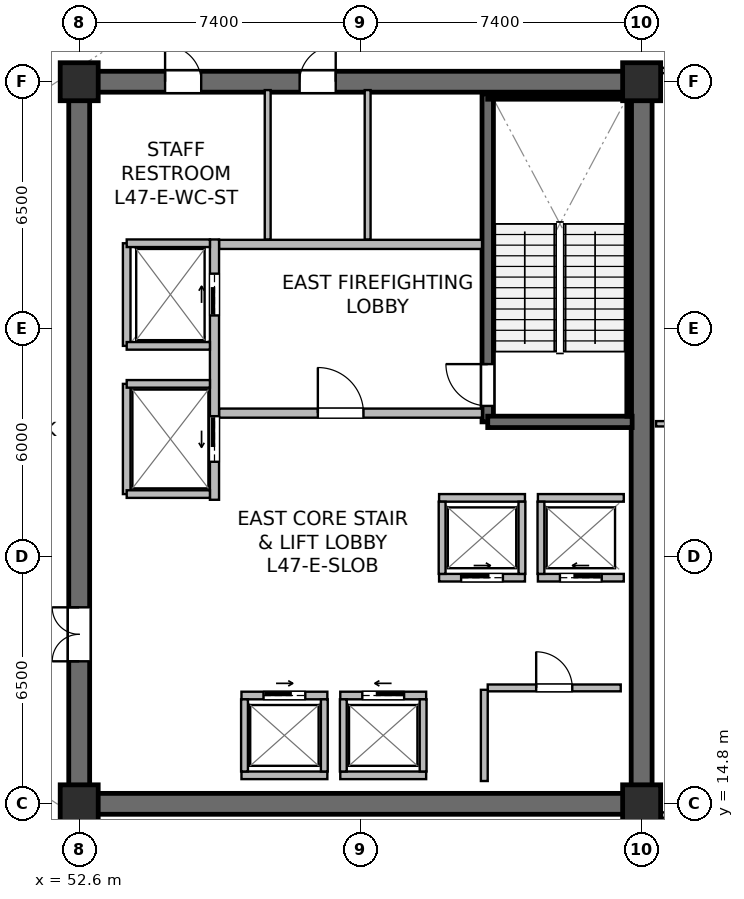
"""IFC4 building model, lengths in metres.
Left out: names, types, materials, properties, quantities, classifications, styles, units other than length and angle.
Written with IfcOpenShell. Run it as: python <this file> out.ifc"""

import sys

from ifc_helpers import new_model, si_unit, direction, frame, frame_2d, origin, origin_2d, place, context, subcontext, project, spatial, rectangle, extrude, source, transform, mapped, element, fill, save


model = new_model("IFC4")
c1 = context("Model", 3, precision=1e-05, world=origin(), true_north=direction((0.0, 1.0)))
c2 = subcontext(c1, "Body", "Model", "MODEL_VIEW")
j1 = project(units=[si_unit("LENGTHUNIT", "METRE"), si_unit("PLANEANGLEUNIT", "RADIAN")], contexts=[c1])
p1 = place(None, origin())
s1 = spatial("IfcSite", under=j1, at=p1, CompositionType="ELEMENT")
p2 = place(p1, origin())
s2 = spatial("IfcBuilding", under=s1, at=p2, CompositionType="ELEMENT")
p3 = place(p2, frame((0.0, 0.0, 196.6)))
s3 = spatial("IfcBuildingStorey", under=s2, at=p3, CompositionType="ELEMENT", Elevation=196.6)
p4 = place(p3, frame((52.325, 14.8, 0.0), z_axis=(0.0, 0.0, 1.0), x_axis=(1.0, 0.0, 0.0)))
e1 = element("IfcWall", 1, at=p4, inside=s3, PredefinedType="SHEAR", context=c2, shape_type="SweptSolid", body=[
    extrude(rectangle(XDim=15.35, YDim=0.55, at=frame_2d((7.675, 0.0))), origin(), (0.0, 0.0, 1.0), 4.5),
])
p5 = place(p3, frame((52.325, 33.8, 0.0), z_axis=(0.0, 0.0, 1.0), x_axis=(1.0, 0.0, 0.0)))
e2 = element("IfcWall", 2, at=p5, inside=s3, PredefinedType="SHEAR", context=c2, shape_type="SweptSolid", body=[
    extrude(rectangle(XDim=15.35, YDim=0.55, at=frame_2d((7.675, 0.0))), origin(), (0.0, 0.0, 1.0), 4.5),
])
p6 = place(p5, frame((6.075, 0.0, 0.0)))
e3 = element("IfcOpeningElement", 3, at=p6, cuts=e2, PredefinedType="OPENING", context=c2, shape_type="SweptSolid", body=[
    extrude(rectangle(XDim=0.95, YDim=2.15, at=frame_2d((0.475, 1.075))), frame((0.0, 0.285, 0.0), z_axis=(0.0, -1.0, 0.0), x_axis=(1.0, 0.0, 0.0)), (0.0, 0.0, 1.0), 0.57),
])
p7 = place(p5, frame((2.535, 0.0, 0.0)))
e4 = element("IfcOpeningElement", 4, at=p7, cuts=e2, PredefinedType="OPENING", context=c2, shape_type="SweptSolid", body=[
    extrude(rectangle(XDim=0.95, YDim=2.15, at=frame_2d((0.475, 1.075))), frame((0.0, 0.285, 0.0), z_axis=(0.0, -1.0, 0.0), x_axis=(1.0, 0.0, 0.0)), (0.0, 0.0, 1.0), 0.57),
])
p8 = place(p3, frame((52.6, 15.075, 0.0), z_axis=(0.0, 0.0, 1.0), x_axis=(0.0, 1.0, 0.0)))
e5 = element("IfcWall", 5, at=p8, inside=s3, PredefinedType="SHEAR", context=c2, shape_type="SweptSolid", body=[
    extrude(rectangle(XDim=18.45, YDim=0.55, at=frame_2d((9.225, 0.0))), origin(), (0.0, 0.0, 1.0), 4.5),
])
p9 = place(p8, frame((3.475, 0.0, 0.0)))
e6 = element("IfcOpeningElement", 6, at=p9, cuts=e5, PredefinedType="OPENING", context=c2, shape_type="SweptSolid", body=[
    extrude(rectangle(XDim=1.42, YDim=2.2, at=frame_2d((0.71, 1.1))), frame((0.0, 0.285, 0.0), z_axis=(0.0, -1.0, 0.0), x_axis=(1.0, 0.0, 0.0)), (0.0, 0.0, 1.0), 0.57),
])
p10 = place(p3, frame((67.4, 15.075, 0.0), z_axis=(0.0, 0.0, 1.0), x_axis=(0.0, 1.0, 0.0)))
e7 = element("IfcWall", 7, at=p10, inside=s3, PredefinedType="SHEAR", context=c2, shape_type="SweptSolid", body=[
    extrude(rectangle(XDim=18.45, YDim=0.55, at=frame_2d((9.225, 0.0))), origin(), (0.0, 0.0, 1.0), 4.5),
])
p11 = place(p3, frame((63.35, 24.85, 0.0), z_axis=(0.0, 0.0, 1.0), x_axis=(0.0, 1.0, 0.0)))
e8 = element("IfcWall", 8, at=p11, inside=s3, PredefinedType="SHEAR", context=c2, shape_type="SweptSolid", body=[
    extrude(rectangle(XDim=8.63, YDim=0.3, at=frame_2d((4.315, 0.0))), origin(), (0.0, 0.0, 1.0), 4.5),
])
p12 = place(p11, frame((0.42, 0.0, 0.0)))
e9 = element("IfcOpeningElement", 9, at=p12, cuts=e8, PredefinedType="OPENING", context=c2, shape_type="SweptSolid", body=[
    extrude(rectangle(XDim=1.1, YDim=2.15, at=frame_2d((0.55, 1.075))), frame((0.0, 0.16, 0.0), z_axis=(0.0, -1.0, 0.0), x_axis=(1.0, 0.0, 0.0)), (0.0, 0.0, 1.0), 0.32),
])
p13 = place(p3, frame((63.35, 24.85, 0.0), z_axis=(0.0, 0.0, 1.0), x_axis=(1.0, 0.0, 0.0)))
e10 = element("IfcWall", 10, at=p13, inside=s3, PredefinedType="SHEAR", context=c2, shape_type="SweptSolid", body=[
    extrude(rectangle(XDim=3.8, YDim=0.3, at=frame_2d((1.9, 0.0))), origin(), (0.0, 0.0, 1.0), 4.5),
])
p14 = place(p3, frame((63.35, 33.4, 0.0), z_axis=(0.0, 0.0, 1.0), x_axis=(1.0, 0.0, 0.0)))
e11 = element("IfcWall", 11, at=p14, inside=s3, PredefinedType="SOLIDWALL", context=c2, shape_type="SweptSolid", body=[
    extrude(rectangle(XDim=3.72, YDim=0.12, at=frame_2d((1.86, 0.0))), origin(), (0.0, 0.0, 1.0), 4.5),
])
p15 = place(p3, frame((67.07, 25.0, 0.0), z_axis=(0.0, 0.0, 1.0), x_axis=(0.0, 1.0, 0.0)))
e12 = element("IfcWall", 12, at=p15, inside=s3, PredefinedType="SOLIDWALL", context=c2, shape_type="SweptSolid", body=[
    extrude(rectangle(XDim=8.32, YDim=0.12, at=frame_2d((4.16, 0.0))), origin(), (0.0, 0.0, 1.0), 4.5),
])
m1 = source(origin(), c2, "Body", "SweptSolid", [
    extrude(rectangle(XDim=1.0, YDim=1.0, at=origin_2d()), origin(), (0.0, 0.0, 1.0), 4.8),
])
for number, where, z_axis, x_axis in (
    (13, (52.6, 14.8, 0.0), (0.0, 0.0, 1.0), (1.0, 0.0, 0.0)),
    (14, (67.4, 14.8, 0.0), (0.0, 0.0, 1.0), (1.0, 0.0, 0.0)),
    (15, (52.6, 33.8, 0.0), (0.0, 0.0, 1.0), (1.0, 0.0, 0.0)),
    (16, (67.4, 33.8, 0.0), (0.0, 0.0, 1.0), (1.0, 0.0, 0.0)),
):
    element("IfcColumn", number, at=place(p3, frame(where, z_axis=z_axis, x_axis=x_axis)), inside=s3, PredefinedType="COLUMN", context=c2, shape_type="MappedRepresentation", body=[
        mapped(m1, transform((0.0, 0.0, 0.0), scale=1.0)),
    ])
p16 = place(p3, frame((56.28, 25.08, 0.0), z_axis=(0.0, 0.0, 1.0), x_axis=(1.0, 0.0, 0.0)))
e17 = element("IfcWall", 17, at=p16, inside=s3, PredefinedType="SOLIDWALL", context=c2, shape_type="SweptSolid", body=[
    extrude(rectangle(XDim=6.92, YDim=0.24, at=frame_2d((3.46, 0.0))), origin(), (0.0, 0.0, 1.0), 3.897),
])
p17 = place(p16, frame((2.6, 0.0, 0.0)))
e18 = element("IfcOpeningElement", 18, at=p17, cuts=e17, PredefinedType="OPENING", context=c2, shape_type="SweptSolid", body=[
    extrude(rectangle(XDim=1.2, YDim=2.16, at=frame_2d((0.6, 1.08))), frame((0.0, 0.13, 0.0), z_axis=(0.0, -1.0, 0.0), x_axis=(1.0, 0.0, 0.0)), (0.0, 0.0, 1.0), 0.26),
])
p18 = place(p3, frame((56.28, 29.52, 0.0), z_axis=(0.0, 0.0, 1.0), x_axis=(1.0, 0.0, 0.0)))
e19 = element("IfcWall", 19, at=p18, inside=s3, PredefinedType="SOLIDWALL", context=c2, shape_type="SweptSolid", body=[
    extrude(rectangle(XDim=6.92, YDim=0.24, at=frame_2d((3.46, 0.0))), origin(), (0.0, 0.0, 1.0), 3.897),
])
p19 = place(p3, frame((56.16, 22.8, 0.0), z_axis=(0.0, 0.0, 1.0), x_axis=(0.0, 1.0, 0.0)))
e20 = element("IfcWall", 20, at=p19, inside=s3, PredefinedType="SOLIDWALL", context=c2, shape_type="SweptSolid", body=[
    extrude(rectangle(XDim=6.85, YDim=0.24, at=frame_2d((3.425, 0.0))), origin(), (0.0, 0.0, 1.0), 3.635),
])
p20 = place(p19, frame((4.85, 0.0, 0.0)))
e21 = element("IfcOpeningElement", 21, at=p20, cuts=e20, PredefinedType="OPENING", context=c2, shape_type="SweptSolid", body=[
    extrude(rectangle(XDim=1.1, YDim=2.22, at=frame_2d((0.55, 1.11))), frame((0.0, 0.13, 0.0), z_axis=(0.0, -1.0, 0.0), x_axis=(1.0, 0.0, 0.0)), (0.0, 0.0, 1.0), 0.26),
])
p21 = place(p19, frame((1.0, 0.0, 0.0)))
e22 = element("IfcOpeningElement", 22, at=p21, cuts=e20, PredefinedType="OPENING", context=c2, shape_type="SweptSolid", body=[
    extrude(rectangle(XDim=1.2, YDim=2.22, at=frame_2d((0.6, 1.11))), frame((0.0, 0.13, 0.0), z_axis=(0.0, -1.0, 0.0), x_axis=(1.0, 0.0, 0.0)), (0.0, 0.0, 1.0), 0.26),
])
p22 = place(p3, frame((59.47, 17.65, 0.0), z_axis=(0.0, 0.0, 1.0), x_axis=(1.0, 0.0, 0.0)))
e23 = element("IfcWall", 23, at=p22, inside=s3, PredefinedType="SOLIDWALL", context=c2, shape_type="SweptSolid", body=[
    extrude(rectangle(XDim=2.26, YDim=0.2, at=frame_2d((1.13, 0.0))), origin(), (0.0, 0.0, 1.0), 3.897),
])
p23 = place(p22, frame((0.58, 0.0, 0.0)))
e24 = element("IfcOpeningElement", 24, at=p23, cuts=e23, PredefinedType="OPENING", context=c2, shape_type="SweptSolid", body=[
    extrude(rectangle(XDim=1.1, YDim=2.22, at=frame_2d((0.55, 1.11))), frame((0.0, 0.11, 0.0), z_axis=(0.0, -1.0, 0.0), x_axis=(1.0, 0.0, 0.0)), (0.0, 0.0, 1.0), 0.22),
])
p24 = place(p3, frame((59.47, 15.55, 0.0), z_axis=(0.0, 0.0, 1.0), x_axis=(1.0, 0.0, 0.0)))
e25 = element("IfcWall", 25, at=p24, inside=s3, PredefinedType="SOLIDWALL", context=c2, shape_type="SweptSolid", body=[
    extrude(rectangle(XDim=2.26, YDim=0.2, at=frame_2d((1.13, 0.0))), origin(), (0.0, 0.0, 1.0), 3.897),
])
for number, where, z_axis, x_axis in (
    (26, (59.55, 15.65, 0.0), (0.0, 0.0, 1.0), (0.0, 1.0, 0.0)),
    (27, (61.65, 15.65, 0.0), (0.0, 0.0, 1.0), (0.0, 1.0, 0.0)),
):
    element("IfcWall", number, at=place(p3, frame(where, z_axis=z_axis, x_axis=x_axis)), inside=s3, PredefinedType="SOLIDWALL", context=c2, shape_type="SweptSolid", body=[
        extrude(rectangle(XDim=1.9, YDim=0.18, at=frame_2d((0.95, 0.0))), origin(), (0.0, 0.0, 1.0), 4.5),
    ])
p25 = place(p3, frame((56.87, 17.65, 0.0), z_axis=(0.0, 0.0, 1.0), x_axis=(1.0, 0.0, 0.0)))
e28 = element("IfcWall", 28, at=p25, inside=s3, PredefinedType="SOLIDWALL", context=c2, shape_type="SweptSolid", body=[
    extrude(rectangle(XDim=2.26, YDim=0.2, at=frame_2d((1.13, 0.0))), origin(), (0.0, 0.0, 1.0), 4.5),
])
p26 = place(p25, frame((0.58, 0.0, 0.0)))
e29 = element("IfcOpeningElement", 29, at=p26, cuts=e28, PredefinedType="OPENING", context=c2, shape_type="SweptSolid", body=[
    extrude(rectangle(XDim=1.1, YDim=2.22, at=frame_2d((0.55, 1.11))), frame((0.0, 0.11, 0.0), z_axis=(0.0, -1.0, 0.0), x_axis=(1.0, 0.0, 0.0)), (0.0, 0.0, 1.0), 0.22),
])
p27 = place(p3, frame((56.87, 15.55, 0.0), z_axis=(0.0, 0.0, 1.0), x_axis=(1.0, 0.0, 0.0)))
e30 = element("IfcWall", 30, at=p27, inside=s3, PredefinedType="SOLIDWALL", context=c2, shape_type="SweptSolid", body=[
    extrude(rectangle(XDim=2.26, YDim=0.2, at=frame_2d((1.13, 0.0))), origin(), (0.0, 0.0, 1.0), 4.5),
])
for number, where, z_axis, x_axis in (
    (31, (56.95, 15.65, 0.0), (0.0, 0.0, 1.0), (0.0, 1.0, 0.0)),
    (32, (59.05, 15.65, 0.0), (0.0, 0.0, 1.0), (0.0, 1.0, 0.0)),
):
    element("IfcWall", number, at=place(p3, frame(where, z_axis=z_axis, x_axis=x_axis)), inside=s3, PredefinedType="SOLIDWALL", context=c2, shape_type="SweptSolid", body=[
        extrude(rectangle(XDim=1.9, YDim=0.18, at=frame_2d((0.95, 0.0))), origin(), (0.0, 0.0, 1.0), 4.5),
    ])
p28 = place(p3, frame((64.67, 20.75, 0.0), z_axis=(0.0, 0.0, 1.0), x_axis=(1.0, 0.0, 0.0)))
e33 = element("IfcWall", 33, at=p28, inside=s3, PredefinedType="SOLIDWALL", context=c2, shape_type="SweptSolid", body=[
    extrude(rectangle(XDim=2.26, YDim=0.2, at=frame_2d((1.13, 0.0))), origin(), (0.0, 0.0, 1.0), 4.5),
])
p29 = place(p28, frame((0.58, 0.0, 0.0)))
e34 = element("IfcOpeningElement", 34, at=p29, cuts=e33, PredefinedType="OPENING", context=c2, shape_type="SweptSolid", body=[
    extrude(rectangle(XDim=1.1, YDim=2.22, at=frame_2d((0.55, 1.11))), frame((0.0, 0.11, 0.0), z_axis=(0.0, -1.0, 0.0), x_axis=(1.0, 0.0, 0.0)), (0.0, 0.0, 1.0), 0.22),
])
p30 = place(p3, frame((64.67, 22.85, 0.0), z_axis=(0.0, 0.0, 1.0), x_axis=(1.0, 0.0, 0.0)))
e35 = element("IfcWall", 35, at=p30, inside=s3, PredefinedType="SOLIDWALL", context=c2, shape_type="SweptSolid", body=[
    extrude(rectangle(XDim=2.26, YDim=0.2, at=frame_2d((1.13, 0.0))), origin(), (0.0, 0.0, 1.0), 4.5),
])
p31 = place(p3, frame((64.75, 20.85, 0.0), z_axis=(0.0, 0.0, 1.0), x_axis=(0.0, 1.0, 0.0)))
e36 = element("IfcWall", 36, at=p31, inside=s3, PredefinedType="SOLIDWALL", context=c2, shape_type="SweptSolid", body=[
    extrude(rectangle(XDim=1.9, YDim=0.18, at=frame_2d((0.95, 0.0))), origin(), (0.0, 0.0, 1.0), 4.5),
])
p32 = place(p3, frame((62.07, 20.75, 0.0), z_axis=(0.0, 0.0, 1.0), x_axis=(1.0, 0.0, 0.0)))
e37 = element("IfcWall", 37, at=p32, inside=s3, PredefinedType="SOLIDWALL", context=c2, shape_type="SweptSolid", body=[
    extrude(rectangle(XDim=2.26, YDim=0.2, at=frame_2d((1.13, 0.0))), origin(), (0.0, 0.0, 1.0), 4.5),
])
p33 = place(p32, frame((0.58, 0.0, 0.0)))
e38 = element("IfcOpeningElement", 38, at=p33, cuts=e37, PredefinedType="OPENING", context=c2, shape_type="SweptSolid", body=[
    extrude(rectangle(XDim=1.1, YDim=2.22, at=frame_2d((0.55, 1.11))), frame((0.0, 0.11, 0.0), z_axis=(0.0, -1.0, 0.0), x_axis=(1.0, 0.0, 0.0)), (0.0, 0.0, 1.0), 0.22),
])
p34 = place(p3, frame((62.07, 22.85, 0.0), z_axis=(0.0, 0.0, 1.0), x_axis=(1.0, 0.0, 0.0)))
e39 = element("IfcWall", 39, at=p34, inside=s3, PredefinedType="SOLIDWALL", context=c2, shape_type="SweptSolid", body=[
    extrude(rectangle(XDim=2.26, YDim=0.2, at=frame_2d((1.13, 0.0))), origin(), (0.0, 0.0, 1.0), 4.5),
])
for number, where, z_axis, x_axis in (
    (40, (62.15, 20.85, 0.0), (0.0, 0.0, 1.0), (0.0, 1.0, 0.0)),
    (41, (64.25, 20.85, 0.0), (0.0, 0.0, 1.0), (0.0, 1.0, 0.0)),
):
    element("IfcWall", number, at=place(p3, frame(where, z_axis=z_axis, x_axis=x_axis)), inside=s3, PredefinedType="SOLIDWALL", context=c2, shape_type="SweptSolid", body=[
        extrude(rectangle(XDim=1.9, YDim=0.18, at=frame_2d((0.95, 0.0))), origin(), (0.0, 0.0, 1.0), 4.5),
    ])
p35 = place(p3, frame((53.85, 26.85, 0.0), z_axis=(0.0, 0.0, 1.0), x_axis=(0.0, 1.0, 0.0)))
e42 = element("IfcWall", 42, at=p35, inside=s3, PredefinedType="SOLIDWALL", context=c2, shape_type="SweptSolid", body=[
    extrude(rectangle(XDim=2.7, YDim=0.2, at=frame_2d((1.35, 0.0))), origin(), (0.0, 0.0, 1.0), 4.5),
])
p36 = place(p3, frame((53.85, 29.55, 0.0), z_axis=(0.0, 0.0, 1.0), x_axis=(1.0, 0.0, 0.0)))
e43 = element("IfcWall", 43, at=p36, inside=s3, PredefinedType="SOLIDWALL", context=c2, shape_type="SweptSolid", body=[
    extrude(rectangle(XDim=2.19, YDim=0.2, at=frame_2d((1.095, 0.0))), origin(), (0.0, 0.0, 1.0), 4.5),
])
p37 = place(p3, frame((53.85, 26.85, 0.0), z_axis=(0.0, 0.0, 1.0), x_axis=(1.0, 0.0, 0.0)))
e44 = element("IfcWall", 44, at=p37, inside=s3, PredefinedType="SOLIDWALL", context=c2, shape_type="SweptSolid", body=[
    extrude(rectangle(XDim=2.19, YDim=0.2, at=frame_2d((1.095, 0.0))), origin(), (0.0, 0.0, 1.0), 3.897),
])
p38 = place(p3, frame((53.85, 22.95, 0.0), z_axis=(0.0, 0.0, 1.0), x_axis=(0.0, 1.0, 0.0)))
e45 = element("IfcWall", 45, at=p38, inside=s3, PredefinedType="SOLIDWALL", context=c2, shape_type="SweptSolid", body=[
    extrude(rectangle(XDim=2.9, YDim=0.2, at=frame_2d((1.45, 0.0))), origin(), (0.0, 0.0, 1.0), 3.635),
])
for number, where, z_axis, x_axis in (
    (46, (53.85, 25.85, 0.0), (0.0, 0.0, 1.0), (1.0, 0.0, 0.0)),
    (47, (53.85, 22.95, 0.0), (0.0, 0.0, 1.0), (1.0, 0.0, 0.0)),
):
    element("IfcWall", number, at=place(p3, frame(where, z_axis=z_axis, x_axis=x_axis)), inside=s3, PredefinedType="SOLIDWALL", context=c2, shape_type="SweptSolid", body=[
        extrude(rectangle(XDim=2.19, YDim=0.2, at=frame_2d((1.095, 0.0))), origin(), (0.0, 0.0, 1.0), 4.5),
    ])
p39 = place(p3, frame((63.35, 17.85, 0.0), z_axis=(0.0, 0.0, 1.0), x_axis=(1.0, 0.0, 0.0)))
e48 = element("IfcWall", 48, at=p39, inside=s3, PredefinedType="SOLIDWALL", context=c2, shape_type="SweptSolid", body=[
    extrude(rectangle(XDim=3.5, YDim=0.18, at=frame_2d((1.75, 0.0))), origin(), (0.0, 0.0, 1.0), 4.5),
])
p40 = place(p39, frame((1.275, 0.0, 0.0)))
e49 = element("IfcOpeningElement", 49, at=p40, cuts=e48, PredefinedType="OPENING", context=c2, shape_type="SweptSolid", body=[
    extrude(rectangle(XDim=0.95, YDim=2.15, at=frame_2d((0.475, 1.075))), frame((0.0, 0.1, 0.0), z_axis=(0.0, -1.0, 0.0), x_axis=(1.0, 0.0, 0.0)), (0.0, 0.0, 1.0), 0.2),
])
p41 = place(p3, frame((63.26, 15.4, 0.0), z_axis=(0.0, 0.0, 1.0), x_axis=(0.0, 1.0, 0.0)))
e50 = element("IfcWall", 50, at=p41, inside=s3, PredefinedType="SOLIDWALL", context=c2, shape_type="SweptSolid", body=[
    extrude(rectangle(XDim=2.4, YDim=0.18, at=frame_2d((1.2, 0.0))), origin(), (0.0, 0.0, 1.0), 4.5),
])
p42 = place(p3, frame((60.19, 29.65, 0.0), z_axis=(0.0, 0.0, 1.0), x_axis=(0.0, 1.0, 0.0)))
e51 = element("IfcWall", 51, at=p42, inside=s3, PredefinedType="PLUMBINGWALL", context=c2, shape_type="SweptSolid", body=[
    extrude(rectangle(XDim=3.93, YDim=0.155, at=frame_2d((1.965, 0.0))), origin(), (0.0, 0.0, 1.0), 3.897),
])
p43 = place(p3, frame((57.56, 29.65, 0.0), z_axis=(0.0, 0.0, 1.0), x_axis=(0.0, 1.0, 0.0)))
e52 = element("IfcWall", 52, at=p43, inside=s3, PredefinedType="PLUMBINGWALL", context=c2, shape_type="SweptSolid", body=[
    extrude(rectangle(XDim=3.93, YDim=0.155, at=frame_2d((1.965, 0.0))), origin(), (0.0, 0.0, 1.0), 4.5),
])
p44 = place(p3, frame((67.78, 24.8, 0.0), z_axis=(0.0, 0.0, 1.0), x_axis=(1.0, 0.0, 0.0)))
e53 = element("IfcWall", 53, at=p44, inside=s3, PredefinedType="PARTITIONING", context=c2, shape_type="SweptSolid", body=[
    extrude(rectangle(XDim=2.91, YDim=0.14, at=frame_2d((1.455, 0.0))), origin(), (0.0, 0.0, 1.0), 4.5),
])
p45 = place(p3, frame((67.78, 14.505, 0.0), z_axis=(0.0, 0.0, 1.0), x_axis=(1.0, 0.0, 0.0)))
e54 = element("IfcWall", 54, at=p45, inside=s3, PredefinedType="PARTITIONING", context=c2, shape_type="SweptSolid", body=[
    extrude(rectangle(XDim=2.91, YDim=0.14, at=frame_2d((1.455, 0.0))), origin(), (0.0, 0.0, 1.0), 4.5),
])
p46 = place(p45, frame((1.005, 0.0, 0.0)))
e55 = element("IfcOpeningElement", 55, at=p46, cuts=e54, PredefinedType="OPENING", context=c2, shape_type="SweptSolid", body=[
    extrude(rectangle(XDim=0.9, YDim=2.1, at=frame_2d((0.45, 1.05))), frame((0.0, 0.08, 0.0), z_axis=(0.0, -1.0, 0.0), x_axis=(1.0, 0.0, 0.0)), (0.0, 0.0, 1.0), 0.16),
])
p47 = place(p3, frame((67.78, 34.095, 0.0), z_axis=(0.0, 0.0, 1.0), x_axis=(1.0, 0.0, 0.0)))
e56 = element("IfcWall", 56, at=p47, inside=s3, PredefinedType="PARTITIONING", context=c2, shape_type="SweptSolid", body=[
    extrude(rectangle(XDim=2.91, YDim=0.14, at=frame_2d((1.455, 0.0))), origin(), (0.0, 0.0, 1.0), 4.5),
])
p48 = place(p47, frame((1.005, 0.0, 0.0)))
e57 = element("IfcOpeningElement", 57, at=p48, cuts=e56, PredefinedType="OPENING", context=c2, shape_type="SweptSolid", body=[
    extrude(rectangle(XDim=0.9, YDim=2.1, at=frame_2d((0.45, 1.05))), frame((0.0, 0.08, 0.0), z_axis=(0.0, -1.0, 0.0), x_axis=(1.0, 0.0, 0.0)), (0.0, 0.0, 1.0), 0.16),
])
m2 = source(origin(), c2, "Body", "SweptSolid", [
    extrude(rectangle(XDim=1.1, YDim=2.15, at=frame_2d((0.55, 1.075))), frame((0.0, 0.025, 0.0), z_axis=(0.0, -1.0, 0.0), x_axis=(1.0, 0.0, 0.0)), (0.0, 0.0, 1.0), 0.05),
])
p49 = place(p12, origin())
e58 = element("IfcDoor", 58, at=p49, inside=s3, OperationType="SINGLE_SWING_RIGHT", PredefinedType="DOOR", context=c2, shape_type="MappedRepresentation", body=[
    mapped(m2, transform((0.0, 0.0, 0.0), scale=1.0)),
])
fill(e9, e58)
m3 = source(origin(), c2, "Body", "SweptSolid", [
    extrude(rectangle(XDim=1.2, YDim=2.16, at=frame_2d((0.6, 1.08))), frame((0.0, 0.025, 0.0), z_axis=(0.0, -1.0, 0.0), x_axis=(1.0, 0.0, 0.0)), (0.0, 0.0, 1.0), 0.05),
])
p50 = place(p17, origin())
e59 = element("IfcDoor", 59, at=p50, inside=s3, OperationType="SINGLE_SWING_LEFT", PredefinedType="DOOR", context=c2, shape_type="MappedRepresentation", body=[
    mapped(m3, transform((0.0, 0.0, 0.0), scale=1.0)),
])
fill(e18, e59)
m4 = source(origin(), c2, "Body", "SweptSolid", [
    extrude(rectangle(XDim=1.1, YDim=2.22, at=frame_2d((0.55, 1.11))), frame((0.0, 0.025, 0.0), z_axis=(0.0, -1.0, 0.0), x_axis=(1.0, 0.0, 0.0)), (0.0, 0.0, 1.0), 0.05),
])
p51 = place(p23, origin())
e60 = element("IfcDoor", 60, at=p51, inside=s3, OperationType="SLIDING_TO_LEFT", PredefinedType="USERDEFINED", context=c2, shape_type="MappedRepresentation", body=[
    mapped(m4, transform((0.0, 0.0, 0.0), scale=1.0)),
])
fill(e24, e60)
p52 = place(p26, origin())
e61 = element("IfcDoor", 61, at=p52, inside=s3, OperationType="SLIDING_TO_RIGHT", PredefinedType="USERDEFINED", context=c2, shape_type="MappedRepresentation", body=[
    mapped(m4, transform((0.0, 0.0, 0.0), scale=1.0)),
])
fill(e29, e61)
p53 = place(p29, origin())
e62 = element("IfcDoor", 62, at=p53, inside=s3, OperationType="SLIDING_TO_LEFT", PredefinedType="USERDEFINED", context=c2, shape_type="MappedRepresentation", body=[
    mapped(m4, transform((0.0, 0.0, 0.0), scale=1.0)),
])
fill(e34, e62)
p54 = place(p33, origin())
e63 = element("IfcDoor", 63, at=p54, inside=s3, OperationType="SLIDING_TO_RIGHT", PredefinedType="USERDEFINED", context=c2, shape_type="MappedRepresentation", body=[
    mapped(m4, transform((0.0, 0.0, 0.0), scale=1.0)),
])
fill(e38, e63)
p55 = place(p20, origin())
e64 = element("IfcDoor", 64, at=p55, inside=s3, OperationType="SLIDING_TO_RIGHT", PredefinedType="USERDEFINED", context=c2, shape_type="MappedRepresentation", body=[
    mapped(m4, transform((0.0, 0.0, 0.0), scale=1.0)),
])
fill(e21, e64)
m5 = source(origin(), c2, "Body", "SweptSolid", [
    extrude(rectangle(XDim=1.2, YDim=2.22, at=frame_2d((0.6, 1.11))), frame((0.0, 0.025, 0.0), z_axis=(0.0, -1.0, 0.0), x_axis=(1.0, 0.0, 0.0)), (0.0, 0.0, 1.0), 0.05),
])
p56 = place(p21, origin())
e65 = element("IfcDoor", 65, at=p56, inside=s3, OperationType="SLIDING_TO_LEFT", PredefinedType="USERDEFINED", context=c2, shape_type="MappedRepresentation", body=[
    mapped(m5, transform((0.0, 0.0, 0.0), scale=1.0)),
])
fill(e22, e65)
m6 = source(origin(), c2, "Body", "SweptSolid", [
    extrude(rectangle(XDim=0.95, YDim=2.15, at=frame_2d((0.475, 1.075))), frame((0.0, 0.025, 0.0), z_axis=(0.0, -1.0, 0.0), x_axis=(1.0, 0.0, 0.0)), (0.0, 0.0, 1.0), 0.05),
])
p57 = place(p40, origin())
e66 = element("IfcDoor", 66, at=p57, inside=s3, OperationType="SINGLE_SWING_LEFT", PredefinedType="DOOR", context=c2, shape_type="MappedRepresentation", body=[
    mapped(m6, transform((0.0, 0.0, 0.0), scale=1.0)),
])
fill(e49, e66)
m7 = source(origin(), c2, "Body", "SweptSolid", [
    extrude(rectangle(XDim=1.42, YDim=2.2, at=frame_2d((0.71, 1.1))), frame((0.0, 0.025, 0.0), z_axis=(0.0, -1.0, 0.0), x_axis=(1.0, 0.0, 0.0)), (0.0, 0.0, 1.0), 0.05),
])
p58 = place(p9, origin())
e67 = element("IfcDoor", 67, at=p58, inside=s3, OperationType="DOUBLE_DOOR_SINGLE_SWING", PredefinedType="DOOR", context=c2, shape_type="MappedRepresentation", body=[
    mapped(m7, transform((0.0, 0.0, 0.0), scale=1.0)),
])
fill(e6, e67)
p59 = place(p6, origin())
e68 = element("IfcDoor", 68, at=p59, inside=s3, OperationType="SINGLE_SWING_RIGHT", PredefinedType="DOOR", context=c2, shape_type="MappedRepresentation", body=[
    mapped(m6, transform((0.0, 0.0, 0.0), scale=1.0)),
])
fill(e3, e68)
p60 = place(p7, origin())
e69 = element("IfcDoor", 69, at=p60, inside=s3, OperationType="SINGLE_SWING_LEFT", PredefinedType="DOOR", context=c2, shape_type="MappedRepresentation", body=[
    mapped(m6, transform((0.0, 0.0, 0.0), scale=1.0)),
])
fill(e4, e69)
save(model, sys.argv[1])
